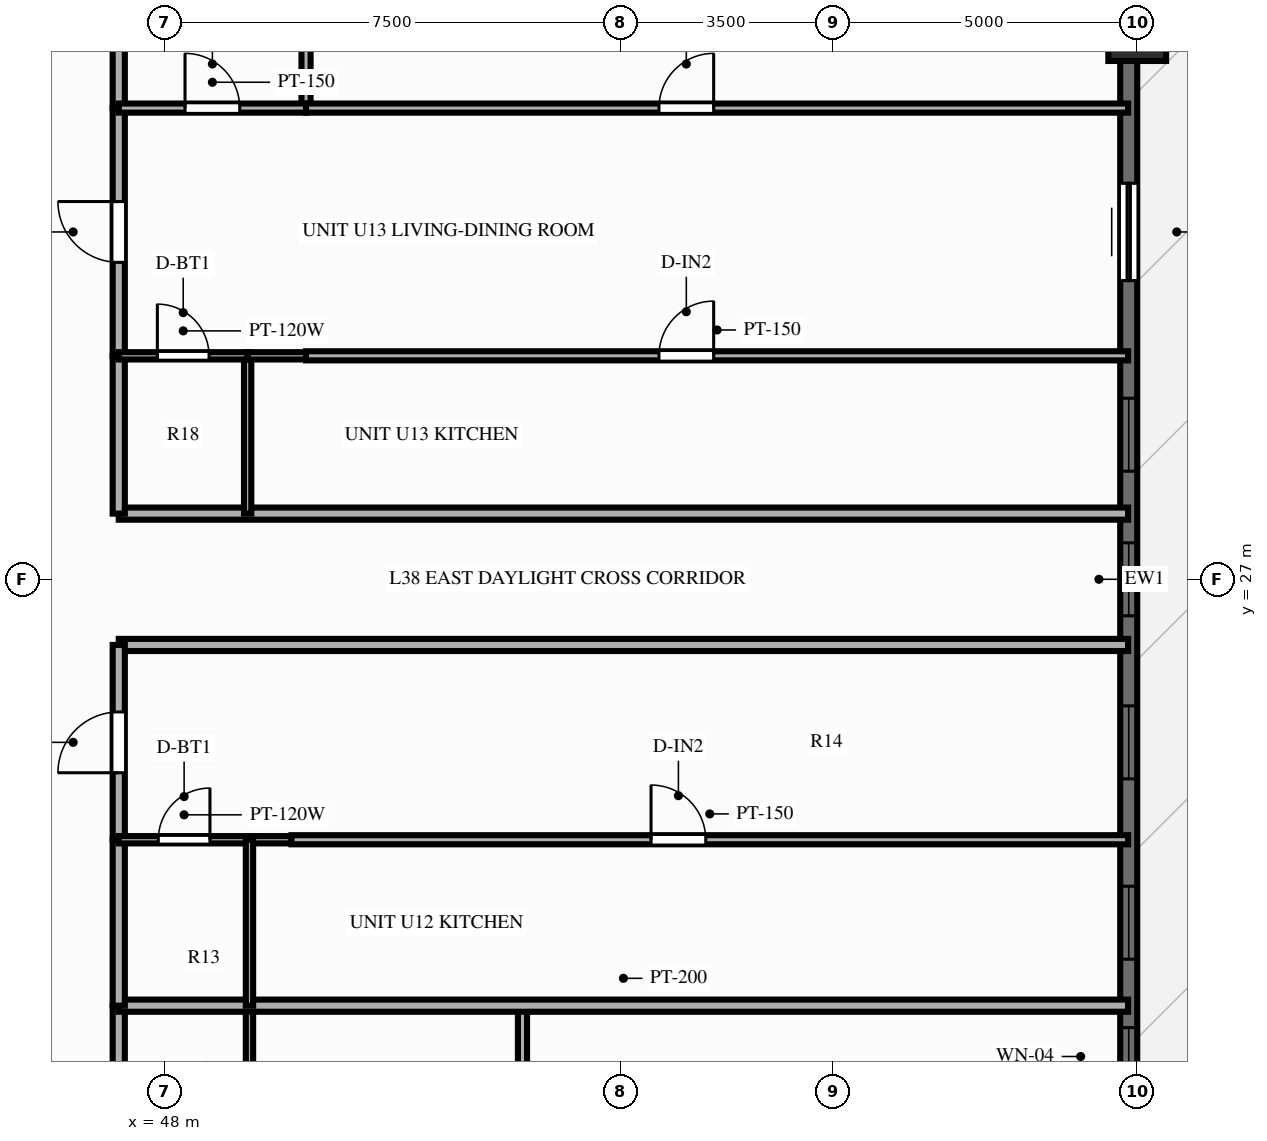
"""IFC4 building model, lengths in metres.
Left out: names, types, materials, properties, quantities, classifications, styles, units other than length and angle.
Written with IfcOpenShell. Run it as: python <this file> out.ifc"""

import sys

from ifc_helpers import new_model, si_unit, direction, frame, frame_2d, origin, origin_2d, place, context, subcontext, project, spatial, rectangle, extrude, source, transform, mapped, element, fill, save


model = new_model("IFC4")
c1 = context("Model", 3, precision=1e-05, world=origin(), true_north=direction((0.0, 1.0)))
c2 = subcontext(c1, "Body", "Model", "MODEL_VIEW")
j1 = project(units=[si_unit("LENGTHUNIT", "METRE"), si_unit("PLANEANGLEUNIT", "RADIAN")], contexts=[c1])
p1 = place(None, origin())
s1 = spatial("IfcSite", under=j1, at=p1, CompositionType="ELEMENT")
p2 = place(p1, origin())
s2 = spatial("IfcBuilding", under=s1, at=p2, CompositionType="ELEMENT")
p3 = place(p2, frame((0.0, 0.0, 119.85)))
s3 = spatial("IfcBuildingStorey", under=s2, at=p3, CompositionType="ELEMENT", Elevation=119.85)
m1 = source(origin(), c2, "Body", "SweptSolid", [
    extrude(rectangle(XDim=0.95, YDim=0.95, at=origin_2d()), origin(), (0.0, 0.0, 1.0), 3.0),
])
p4 = place(p3, frame((64.0, 36.0, 0.0), z_axis=(0.0, 0.0, 1.0), x_axis=(1.0, 0.0, 0.0)))
e1 = element("IfcColumn", 1, at=p4, inside=s3, PredefinedType="COLUMN", context=c2, shape_type="MappedRepresentation", body=[
    mapped(m1, transform((0.0, 0.0, 0.0), scale=1.0)),
])
p5 = place(p3, frame((63.86, 7.2, 0.0), z_axis=(0.0, 0.0, 1.0), x_axis=(0.0, 1.0, 0.0)))
e2 = element("IfcWall", 2, at=p5, inside=s3, PredefinedType="SOLIDWALL", context=c2, shape_type="SweptSolid", body=[
    extrude(rectangle(XDim=39.6, YDim=0.28, at=frame_2d((19.8, 0.0))), origin(), (0.0, 0.0, 1.0), 2.28),
])
p6 = place(p5, frame((1.56, 0.0, 0.25)))
e3 = element("IfcOpeningElement", 3, at=p6, cuts=e2, PredefinedType="OPENING", context=c2, shape_type="SweptSolid", body=[
    extrude(rectangle(XDim=1.2, YDim=1.5, at=frame_2d((0.6, 0.75))), frame((0.0, 0.152, 0.0), z_axis=(0.0, -1.0, 0.0), x_axis=(1.0, 0.0, 0.0)), (0.0, 0.0, 1.0), 0.304),
])
p7 = place(p5, frame((4.829, 0.0, 0.25)))
e4 = element("IfcOpeningElement", 4, at=p7, cuts=e2, PredefinedType="OPENING", context=c2, shape_type="SweptSolid", body=[
    extrude(rectangle(XDim=1.2, YDim=1.5, at=frame_2d((0.6, 0.75))), frame((0.0, 0.152, 0.0), z_axis=(0.0, -1.0, 0.0), x_axis=(1.0, 0.0, 0.0)), (0.0, 0.0, 1.0), 0.304),
])
p8 = place(p5, frame((7.567, 0.0, 0.25)))
e5 = element("IfcOpeningElement", 5, at=p8, cuts=e2, PredefinedType="OPENING", context=c2, shape_type="SweptSolid", body=[
    extrude(rectangle(XDim=1.2, YDim=1.5, at=frame_2d((0.6, 0.75))), frame((0.0, 0.152, 0.0), z_axis=(0.0, -1.0, 0.0), x_axis=(1.0, 0.0, 0.0)), (0.0, 0.0, 1.0), 0.304),
])
p9 = place(p5, frame((11.476, 0.0, 0.25)))
e6 = element("IfcOpeningElement", 6, at=p9, cuts=e2, PredefinedType="OPENING", context=c2, shape_type="SweptSolid", body=[
    extrude(rectangle(XDim=0.95, YDim=1.5, at=frame_2d((0.475, 0.75))), frame((0.0, 0.152, 0.0), z_axis=(0.0, -1.0, 0.0), x_axis=(1.0, 0.0, 0.0)), (0.0, 0.0, 1.0), 0.304),
])
p10 = place(p5, frame((13.552, 0.0, 0.25)))
e7 = element("IfcOpeningElement", 7, at=p10, cuts=e2, PredefinedType="OPENING", context=c2, shape_type="SweptSolid", body=[
    extrude(rectangle(XDim=1.2, YDim=1.5, at=frame_2d((0.6, 0.75))), frame((0.0, 0.152, 0.0), z_axis=(0.0, -1.0, 0.0), x_axis=(1.0, 0.0, 0.0)), (0.0, 0.0, 1.0), 0.304),
])
p11 = place(p5, frame((16.518, 0.0, 0.25)))
e8 = element("IfcOpeningElement", 8, at=p11, cuts=e2, PredefinedType="OPENING", context=c2, shape_type="SweptSolid", body=[
    extrude(rectangle(XDim=1.2, YDim=1.5, at=frame_2d((0.6, 0.75))), frame((0.0, 0.152, 0.0), z_axis=(0.0, -1.0, 0.0), x_axis=(1.0, 0.0, 0.0)), (0.0, 0.0, 1.0), 0.304),
])
p12 = place(p5, frame((19.2, 0.0, 0.25)))
e9 = element("IfcOpeningElement", 9, at=p12, cuts=e2, PredefinedType="OPENING", context=c2, shape_type="SweptSolid", body=[
    extrude(rectangle(XDim=1.2, YDim=1.5, at=frame_2d((0.6, 0.75))), frame((0.0, 0.152, 0.0), z_axis=(0.0, -1.0, 0.0), x_axis=(1.0, 0.0, 0.0)), (0.0, 0.0, 1.0), 0.304),
])
p13 = place(p5, frame((21.578, 0.0, 0.25)))
e10 = element("IfcOpeningElement", 10, at=p13, cuts=e2, PredefinedType="OPENING", context=c2, shape_type="SweptSolid", body=[
    extrude(rectangle(XDim=1.2, YDim=1.5, at=frame_2d((0.6, 0.75))), frame((0.0, 0.152, 0.0), z_axis=(0.0, -1.0, 0.0), x_axis=(1.0, 0.0, 0.0)), (0.0, 0.0, 1.0), 0.304),
])
p14 = place(p5, frame((26.313, 0.0, 0.0), z_axis=(0.0, 0.0, 1.0), x_axis=(-1.0, 0.0, 0.0)))
e11 = element("IfcOpeningElement", 11, at=p14, cuts=e2, PredefinedType="OPENING", context=c2, shape_type="SweptSolid", body=[
    extrude(rectangle(XDim=1.6, YDim=2.15, at=frame_2d((0.8, 1.075))), frame((0.0, 0.152, 0.0), z_axis=(0.0, -1.0, 0.0), x_axis=(1.0, 0.0, 0.0)), (0.0, 0.0, 1.0), 0.304),
])
p15 = place(p5, frame((29.305, 0.0, 0.25)))
e12 = element("IfcOpeningElement", 12, at=p15, cuts=e2, PredefinedType="OPENING", context=c2, shape_type="SweptSolid", body=[
    extrude(rectangle(XDim=0.7, YDim=1.5, at=frame_2d((0.35, 0.75))), frame((0.0, 0.152, 0.0), z_axis=(0.0, -1.0, 0.0), x_axis=(1.0, 0.0, 0.0)), (0.0, 0.0, 1.0), 0.304),
])
p16 = place(p5, frame((30.848, 0.0, 0.25)))
e13 = element("IfcOpeningElement", 13, at=p16, cuts=e2, PredefinedType="OPENING", context=c2, shape_type="SweptSolid", body=[
    extrude(rectangle(XDim=1.2, YDim=1.5, at=frame_2d((0.6, 0.75))), frame((0.0, 0.152, 0.0), z_axis=(0.0, -1.0, 0.0), x_axis=(1.0, 0.0, 0.0)), (0.0, 0.0, 1.0), 0.304),
])
p17 = place(p5, frame((34.183, 0.0, 0.25)))
e14 = element("IfcOpeningElement", 14, at=p17, cuts=e2, PredefinedType="OPENING", context=c2, shape_type="SweptSolid", body=[
    extrude(rectangle(XDim=1.2, YDim=1.5, at=frame_2d((0.6, 0.75))), frame((0.0, 0.152, 0.0), z_axis=(0.0, -1.0, 0.0), x_axis=(1.0, 0.0, 0.0)), (0.0, 0.0, 1.0), 0.304),
])
p18 = place(p5, frame((37.452, 0.0, 0.25)))
e15 = element("IfcOpeningElement", 15, at=p18, cuts=e2, PredefinedType="OPENING", context=c2, shape_type="SweptSolid", body=[
    extrude(rectangle(XDim=1.2, YDim=1.5, at=frame_2d((0.6, 0.75))), frame((0.0, 0.152, 0.0), z_axis=(0.0, -1.0, 0.0), x_axis=(1.0, 0.0, 0.0)), (0.0, 0.0, 1.0), 0.304),
])
p19 = place(p3, frame((47.25, 25.92, 0.0), z_axis=(0.0, 0.0, 1.0), x_axis=(1.0, 0.0, 0.0)))
e16 = element("IfcWall", 16, at=p19, inside=s3, PredefinedType="PARTITIONING", context=c2, shape_type="SweptSolid", body=[
    extrude(rectangle(XDim=16.6, YDim=0.2, at=frame_2d((8.3, 0.0))), origin(), (0.0, 0.0, 1.0), 2.79),
])
p20 = place(p3, frame((47.25, 16.68, 0.0), z_axis=(0.0, 0.0, 1.0), x_axis=(0.0, 1.0, 0.0)))
e17 = element("IfcWall", 17, at=p20, inside=s3, PredefinedType="PARTITIONING", context=c2, shape_type="SweptSolid", body=[
    extrude(rectangle(XDim=3.307, YDim=0.2, at=frame_2d((1.654, 0.0))), origin(), (0.0, 0.0, 1.0), 2.79),
])
p21 = place(p3, frame((49.4, 16.68, 0.0), z_axis=(0.0, 0.0, 1.0), x_axis=(0.0, 1.0, 0.0)))
e18 = element("IfcWall", 18, at=p21, inside=s3, PredefinedType="PARTITIONING", context=c2, shape_type="SweptSolid", body=[
    extrude(rectangle(XDim=3.307, YDim=0.12, at=frame_2d((1.654, 0.0))), origin(), (0.0, 0.0, 1.0), 2.79),
])
p22 = place(p3, frame((53.89, 16.68, 0.0), z_axis=(0.0, 0.0, 1.0), x_axis=(0.0, 1.0, 0.0)))
e19 = element("IfcWall", 19, at=p22, inside=s3, PredefinedType="PARTITIONING", context=c2, shape_type="SweptSolid", body=[
    extrude(rectangle(XDim=3.307, YDim=0.15, at=frame_2d((1.654, 0.0))), origin(), (0.0, 0.0, 1.0), 2.79),
])
p23 = place(p3, frame((47.25, 19.987, 0.0), z_axis=(0.0, 0.0, 1.0), x_axis=(1.0, 0.0, 0.0)))
e20 = element("IfcWall", 20, at=p23, inside=s3, PredefinedType="PARTITIONING", context=c2, shape_type="SweptSolid", body=[
    extrude(rectangle(XDim=16.6, YDim=0.2, at=frame_2d((8.3, 0.0))), origin(), (0.0, 0.0, 1.0), 2.79),
])
p24 = place(p3, frame((47.25, 19.987, 0.0), z_axis=(0.0, 0.0, 1.0), x_axis=(0.0, 1.0, 0.0)))
e21 = element("IfcWall", 21, at=p24, inside=s3, PredefinedType="PARTITIONING", context=c2, shape_type="SweptSolid", body=[
    extrude(rectangle(XDim=2.729, YDim=0.2, at=frame_2d((1.365, 0.0))), origin(), (0.0, 0.0, 1.0), 2.79),
])
p25 = place(p3, frame((47.25, 22.716, 0.0), z_axis=(0.0, 0.0, 1.0), x_axis=(0.0, 1.0, 0.0)))
e22 = element("IfcWall", 22, at=p25, inside=s3, PredefinedType="PARTITIONING", context=c2, shape_type="SweptSolid", body=[
    extrude(rectangle(XDim=3.204, YDim=0.2, at=frame_2d((1.602, 0.0))), origin(), (0.0, 0.0, 1.0), 2.79),
])
p26 = place(p25, frame((1.102, 0.0, 0.0)))
e23 = element("IfcOpeningElement", 23, at=p26, cuts=e22, PredefinedType="OPENING", context=c2, shape_type="SweptSolid", body=[
    extrude(rectangle(XDim=1.0, YDim=2.15, at=frame_2d((0.5, 1.075))), frame((0.0, 0.112, 0.0), z_axis=(0.0, -1.0, 0.0), x_axis=(1.0, 0.0, 0.0)), (0.0, 0.0, 1.0), 0.224),
])
p27 = place(p3, frame((47.25, 22.716, 0.0), z_axis=(0.0, 0.0, 1.0), x_axis=(1.0, 0.0, 0.0)))
e24 = element("IfcWall", 24, at=p27, inside=s3, PredefinedType="PARTITIONING", context=c2, shape_type="SweptSolid", body=[
    extrude(rectangle(XDim=2.15, YDim=0.12, at=frame_2d((1.075, 0.0))), origin(), (0.0, 0.0, 1.0), 2.79),
])
p28 = place(p27, frame((0.65, 0.0, 0.0)))
e25 = element("IfcOpeningElement", 25, at=p28, cuts=e24, PredefinedType="OPENING", context=c2, shape_type="SweptSolid", body=[
    extrude(rectangle(XDim=0.85, YDim=2.05, at=frame_2d((0.425, 1.025))), frame((0.0, 0.072, 0.0), z_axis=(0.0, -1.0, 0.0), x_axis=(1.0, 0.0, 0.0)), (0.0, 0.0, 1.0), 0.144),
])
p29 = place(p3, frame((49.4, 22.716, 0.0), z_axis=(0.0, 0.0, 1.0), x_axis=(1.0, 0.0, 0.0)))
e26 = element("IfcWall", 26, at=p29, inside=s3, PredefinedType="PARTITIONING", context=c2, shape_type="SweptSolid", body=[
    extrude(rectangle(XDim=0.69, YDim=0.12, at=frame_2d((0.345, 0.0))), origin(), (0.0, 0.0, 1.0), 2.79),
])
p30 = place(p3, frame((49.4, 19.987, 0.0), z_axis=(0.0, 0.0, 1.0), x_axis=(0.0, 1.0, 0.0)))
e27 = element("IfcWall", 27, at=p30, inside=s3, PredefinedType="PARTITIONING", context=c2, shape_type="SweptSolid", body=[
    extrude(rectangle(XDim=2.729, YDim=0.12, at=frame_2d((1.365, 0.0))), origin(), (0.0, 0.0, 1.0), 2.79),
])
p31 = place(p3, frame((50.09, 22.716, 0.0), z_axis=(0.0, 0.0, 1.0), x_axis=(1.0, 0.0, 0.0)))
e28 = element("IfcWall", 28, at=p31, inside=s3, PredefinedType="PARTITIONING", context=c2, shape_type="SweptSolid", body=[
    extrude(rectangle(XDim=13.76, YDim=0.15, at=frame_2d((6.88, 0.0))), origin(), (0.0, 0.0, 1.0), 2.79),
])
p32 = place(p31, frame((5.914, 0.0, 0.0)))
e29 = element("IfcOpeningElement", 29, at=p32, cuts=e28, PredefinedType="OPENING", context=c2, shape_type="SweptSolid", body=[
    extrude(rectangle(XDim=0.9, YDim=2.1, at=frame_2d((0.45, 1.05))), frame((0.0, 0.087, 0.0), z_axis=(0.0, -1.0, 0.0), x_axis=(1.0, 0.0, 0.0)), (0.0, 0.0, 1.0), 0.174),
])
p33 = place(p3, frame((47.25, 28.08, 0.0), z_axis=(0.0, 0.0, 1.0), x_axis=(1.0, 0.0, 0.0)))
e30 = element("IfcWall", 30, at=p33, inside=s3, PredefinedType="PARTITIONING", context=c2, shape_type="SweptSolid", body=[
    extrude(rectangle(XDim=16.6, YDim=0.2, at=frame_2d((8.3, 0.0))), origin(), (0.0, 0.0, 1.0), 2.79),
])
p34 = place(p3, frame((47.25, 28.08, 0.0), z_axis=(0.0, 0.0, 1.0), x_axis=(0.0, 1.0, 0.0)))
e31 = element("IfcWall", 31, at=p34, inside=s3, PredefinedType="PARTITIONING", context=c2, shape_type="SweptSolid", body=[
    extrude(rectangle(XDim=2.595, YDim=0.2, at=frame_2d((1.298, 0.0))), origin(), (0.0, 0.0, 1.0), 2.79),
])
p35 = place(p3, frame((47.25, 30.676, 0.0), z_axis=(0.0, 0.0, 1.0), x_axis=(0.0, 1.0, 0.0)))
e32 = element("IfcWall", 32, at=p35, inside=s3, PredefinedType="PARTITIONING", context=c2, shape_type="SweptSolid", body=[
    extrude(rectangle(XDim=4.074, YDim=0.2, at=frame_2d((2.037, 0.0))), origin(), (0.0, 0.0, 1.0), 2.79),
])
p36 = place(p35, frame((1.537, 0.0, 0.0)))
e33 = element("IfcOpeningElement", 33, at=p36, cuts=e32, PredefinedType="OPENING", context=c2, shape_type="SweptSolid", body=[
    extrude(rectangle(XDim=1.0, YDim=2.15, at=frame_2d((0.5, 1.075))), frame((0.0, 0.112, 0.0), z_axis=(0.0, -1.0, 0.0), x_axis=(1.0, 0.0, 0.0)), (0.0, 0.0, 1.0), 0.224),
])
p37 = place(p3, frame((47.25, 34.75, 0.0), z_axis=(0.0, 0.0, 1.0), x_axis=(0.0, 1.0, 0.0)))
e34 = element("IfcWall", 34, at=p37, inside=s3, PredefinedType="PARTITIONING", context=c2, shape_type="SweptSolid", body=[
    extrude(rectangle(XDim=2.6, YDim=0.2, at=frame_2d((1.3, 0.0))), origin(), (0.0, 0.0, 1.0), 2.79),
])
p38 = place(p3, frame((49.37, 28.08, 0.0), z_axis=(0.0, 0.0, 1.0), x_axis=(0.0, 1.0, 0.0)))
e35 = element("IfcWall", 35, at=p38, inside=s3, PredefinedType="PARTITIONING", context=c2, shape_type="SweptSolid", body=[
    extrude(rectangle(XDim=2.595, YDim=0.12, at=frame_2d((1.298, 0.0))), origin(), (0.0, 0.0, 1.0), 2.79),
])
p39 = place(p3, frame((50.33, 34.75, 0.0), z_axis=(0.0, 0.0, 1.0), x_axis=(0.0, 1.0, 0.0)))
e36 = element("IfcWall", 36, at=p39, inside=s3, PredefinedType="PARTITIONING", context=c2, shape_type="SweptSolid", body=[
    extrude(rectangle(XDim=2.6, YDim=0.15, at=frame_2d((1.3, 0.0))), origin(), (0.0, 0.0, 1.0), 2.79),
])
p40 = place(p3, frame((47.25, 30.676, 0.0), z_axis=(0.0, 0.0, 1.0), x_axis=(1.0, 0.0, 0.0)))
e37 = element("IfcWall", 37, at=p40, inside=s3, PredefinedType="PARTITIONING", context=c2, shape_type="SweptSolid", body=[
    extrude(rectangle(XDim=2.12, YDim=0.12, at=frame_2d((1.06, 0.0))), origin(), (0.0, 0.0, 1.0), 2.79),
])
p41 = place(p40, frame((0.635, 0.0, 0.0)))
e38 = element("IfcOpeningElement", 38, at=p41, cuts=e37, PredefinedType="OPENING", context=c2, shape_type="SweptSolid", body=[
    extrude(rectangle(XDim=0.85, YDim=2.05, at=frame_2d((0.425, 1.025))), frame((0.0, 0.072, 0.0), z_axis=(0.0, -1.0, 0.0), x_axis=(1.0, 0.0, 0.0)), (0.0, 0.0, 1.0), 0.144),
])
p42 = place(p3, frame((49.37, 30.676, 0.0), z_axis=(0.0, 0.0, 1.0), x_axis=(1.0, 0.0, 0.0)))
e39 = element("IfcWall", 39, at=p42, inside=s3, PredefinedType="PARTITIONING", context=c2, shape_type="SweptSolid", body=[
    extrude(rectangle(XDim=0.96, YDim=0.12, at=frame_2d((0.48, 0.0))), origin(), (0.0, 0.0, 1.0), 2.79),
])
p43 = place(p3, frame((50.33, 30.676, 0.0), z_axis=(0.0, 0.0, 1.0), x_axis=(1.0, 0.0, 0.0)))
e40 = element("IfcWall", 40, at=p43, inside=s3, PredefinedType="PARTITIONING", context=c2, shape_type="SweptSolid", body=[
    extrude(rectangle(XDim=13.52, YDim=0.15, at=frame_2d((6.76, 0.0))), origin(), (0.0, 0.0, 1.0), 2.79),
])
p44 = place(p43, frame((5.804, 0.0, 0.0)))
e41 = element("IfcOpeningElement", 41, at=p44, cuts=e40, PredefinedType="OPENING", context=c2, shape_type="SweptSolid", body=[
    extrude(rectangle(XDim=0.9, YDim=2.1, at=frame_2d((0.45, 1.05))), frame((0.0, 0.087, 0.0), z_axis=(0.0, -1.0, 0.0), x_axis=(1.0, 0.0, 0.0)), (0.0, 0.0, 1.0), 0.174),
])
p45 = place(p3, frame((47.25, 34.75, 0.0), z_axis=(0.0, 0.0, 1.0), x_axis=(1.0, 0.0, 0.0)))
e42 = element("IfcWall", 42, at=p45, inside=s3, PredefinedType="PARTITIONING", context=c2, shape_type="SweptSolid", body=[
    extrude(rectangle(XDim=3.08, YDim=0.15, at=frame_2d((1.54, 0.0))), origin(), (0.0, 0.0, 1.0), 2.79),
])
p46 = place(p45, frame((1.09, 0.0, 0.0)))
e43 = element("IfcOpeningElement", 43, at=p46, cuts=e42, PredefinedType="OPENING", context=c2, shape_type="SweptSolid", body=[
    extrude(rectangle(XDim=0.9, YDim=2.1, at=frame_2d((0.45, 1.05))), frame((0.0, 0.087, 0.0), z_axis=(0.0, -1.0, 0.0), x_axis=(1.0, 0.0, 0.0)), (0.0, 0.0, 1.0), 0.174),
])
p47 = place(p3, frame((50.33, 34.75, 0.0), z_axis=(0.0, 0.0, 1.0), x_axis=(1.0, 0.0, 0.0)))
e44 = element("IfcWall", 44, at=p47, inside=s3, PredefinedType="PARTITIONING", context=c2, shape_type="SweptSolid", body=[
    extrude(rectangle(XDim=13.52, YDim=0.15, at=frame_2d((6.76, 0.0))), origin(), (0.0, 0.0, 1.0), 2.79),
])
p48 = place(p47, frame((5.804, 0.0, 0.0)))
e45 = element("IfcOpeningElement", 45, at=p48, cuts=e44, PredefinedType="OPENING", context=c2, shape_type="SweptSolid", body=[
    extrude(rectangle(XDim=0.9, YDim=2.1, at=frame_2d((0.45, 1.05))), frame((0.0, 0.087, 0.0), z_axis=(0.0, -1.0, 0.0), x_axis=(1.0, 0.0, 0.0)), (0.0, 0.0, 1.0), 0.174),
])
m2 = source(origin(), c2, "Body", "SweptSolid", [
    extrude(rectangle(XDim=0.95, YDim=1.5, at=frame_2d((0.475, 0.75))), frame((0.0, 0.03, 0.0), z_axis=(0.0, -1.0, 0.0), x_axis=(1.0, 0.0, 0.0)), (0.0, 0.0, 1.0), 0.06),
])
p49 = place(p9, origin())
e46 = element("IfcWindow", 46, at=p49, inside=s3, PartitioningType="SINGLE_PANEL", PredefinedType="WINDOW", context=c2, shape_type="MappedRepresentation", body=[
    mapped(m2, transform((0.0, 0.0, 0.0), scale=1.0)),
])
fill(e6, e46)
m3 = source(origin(), c2, "Body", "SweptSolid", [
    extrude(rectangle(XDim=1.2, YDim=1.5, at=frame_2d((0.6, 0.75))), frame((0.0, 0.03, 0.0), z_axis=(0.0, -1.0, 0.0), x_axis=(1.0, 0.0, 0.0)), (0.0, 0.0, 1.0), 0.06),
])
p50 = place(p10, origin())
e47 = element("IfcWindow", 47, at=p50, inside=s3, PartitioningType="SINGLE_PANEL", PredefinedType="WINDOW", context=c2, shape_type="MappedRepresentation", body=[
    mapped(m3, transform((0.0, 0.0, 0.0), scale=1.0)),
])
fill(e7, e47)
p51 = place(p11, origin())
e48 = element("IfcWindow", 48, at=p51, inside=s3, PartitioningType="SINGLE_PANEL", PredefinedType="WINDOW", context=c2, shape_type="MappedRepresentation", body=[
    mapped(m3, transform((0.0, 0.0, 0.0), scale=1.0)),
])
fill(e8, e48)
p52 = place(p12, origin())
e49 = element("IfcWindow", 49, at=p52, inside=s3, PartitioningType="SINGLE_PANEL", PredefinedType="WINDOW", context=c2, shape_type="MappedRepresentation", body=[
    mapped(m3, transform((0.0, 0.0, 0.0), scale=1.0)),
])
fill(e9, e49)
p53 = place(p13, origin())
e50 = element("IfcWindow", 50, at=p53, inside=s3, PartitioningType="SINGLE_PANEL", PredefinedType="WINDOW", context=c2, shape_type="MappedRepresentation", body=[
    mapped(m3, transform((0.0, 0.0, 0.0), scale=1.0)),
])
fill(e10, e50)
m4 = source(origin(), c2, "Body", "SweptSolid", [
    extrude(rectangle(XDim=1.6, YDim=2.15, at=frame_2d((0.8, 1.075))), frame((0.0, 0.025, 0.0), z_axis=(0.0, -1.0, 0.0), x_axis=(1.0, 0.0, 0.0)), (0.0, 0.0, 1.0), 0.05),
])
p54 = place(p14, origin())
e51 = element("IfcDoor", 51, at=p54, inside=s3, OperationType="SLIDING_TO_LEFT", PredefinedType="DOOR", context=c2, shape_type="MappedRepresentation", body=[
    mapped(m4, transform((0.0, 0.0, 0.0), scale=1.0)),
])
fill(e11, e51)
m5 = source(origin(), c2, "Body", "SweptSolid", [
    extrude(rectangle(XDim=1.0, YDim=2.15, at=frame_2d((0.5, 1.075))), frame((0.0, 0.025, 0.0), z_axis=(0.0, -1.0, 0.0), x_axis=(1.0, 0.0, 0.0)), (0.0, 0.0, 1.0), 0.05),
])
p55 = place(p26, origin())
e52 = element("IfcDoor", 52, at=p55, inside=s3, OperationType="SINGLE_SWING_LEFT", PredefinedType="DOOR", context=c2, shape_type="MappedRepresentation", body=[
    mapped(m5, transform((0.0, 0.0, 0.0), scale=1.0)),
])
fill(e23, e52)
m6 = source(origin(), c2, "Body", "SweptSolid", [
    extrude(rectangle(XDim=0.85, YDim=2.05, at=frame_2d((0.425, 1.025))), frame((0.0, 0.025, 0.0), z_axis=(0.0, -1.0, 0.0), x_axis=(1.0, 0.0, 0.0)), (0.0, 0.0, 1.0), 0.05),
])
p56 = place(p28, origin())
e53 = element("IfcDoor", 53, at=p56, inside=s3, OperationType="SINGLE_SWING_RIGHT", PredefinedType="DOOR", context=c2, shape_type="MappedRepresentation", body=[
    mapped(m6, transform((0.0, 0.0, 0.0), scale=1.0)),
])
fill(e25, e53)
m7 = source(origin(), c2, "Body", "SweptSolid", [
    extrude(rectangle(XDim=0.9, YDim=2.1, at=frame_2d((0.45, 1.05))), frame((0.0, 0.025, 0.0), z_axis=(0.0, -1.0, 0.0), x_axis=(1.0, 0.0, 0.0)), (0.0, 0.0, 1.0), 0.05),
])
p57 = place(p32, origin())
e54 = element("IfcDoor", 54, at=p57, inside=s3, OperationType="SINGLE_SWING_LEFT", PredefinedType="DOOR", context=c2, shape_type="MappedRepresentation", body=[
    mapped(m7, transform((0.0, 0.0, 0.0), scale=1.0)),
])
fill(e29, e54)
p58 = place(p36, origin())
e55 = element("IfcDoor", 55, at=p58, inside=s3, OperationType="SINGLE_SWING_RIGHT", PredefinedType="DOOR", context=c2, shape_type="MappedRepresentation", body=[
    mapped(m5, transform((0.0, 0.0, 0.0), scale=1.0)),
])
fill(e33, e55)
p59 = place(p41, origin())
e56 = element("IfcDoor", 56, at=p59, inside=s3, OperationType="SINGLE_SWING_LEFT", PredefinedType="DOOR", context=c2, shape_type="MappedRepresentation", body=[
    mapped(m6, transform((0.0, 0.0, 0.0), scale=1.0)),
])
fill(e38, e56)
p60 = place(p44, origin())
e57 = element("IfcDoor", 57, at=p60, inside=s3, OperationType="SINGLE_SWING_RIGHT", PredefinedType="DOOR", context=c2, shape_type="MappedRepresentation", body=[
    mapped(m7, transform((0.0, 0.0, 0.0), scale=1.0)),
])
fill(e41, e57)
p61 = place(p46, origin())
e58 = element("IfcDoor", 58, at=p61, inside=s3, OperationType="SINGLE_SWING_LEFT", PredefinedType="DOOR", context=c2, shape_type="MappedRepresentation", body=[
    mapped(m7, transform((0.0, 0.0, 0.0), scale=1.0)),
])
fill(e43, e58)
p62 = place(p48, origin())
e59 = element("IfcDoor", 59, at=p62, inside=s3, OperationType="SINGLE_SWING_RIGHT", PredefinedType="DOOR", context=c2, shape_type="MappedRepresentation", body=[
    mapped(m7, transform((0.0, 0.0, 0.0), scale=1.0)),
])
fill(e45, e59)
save(model, sys.argv[1])
